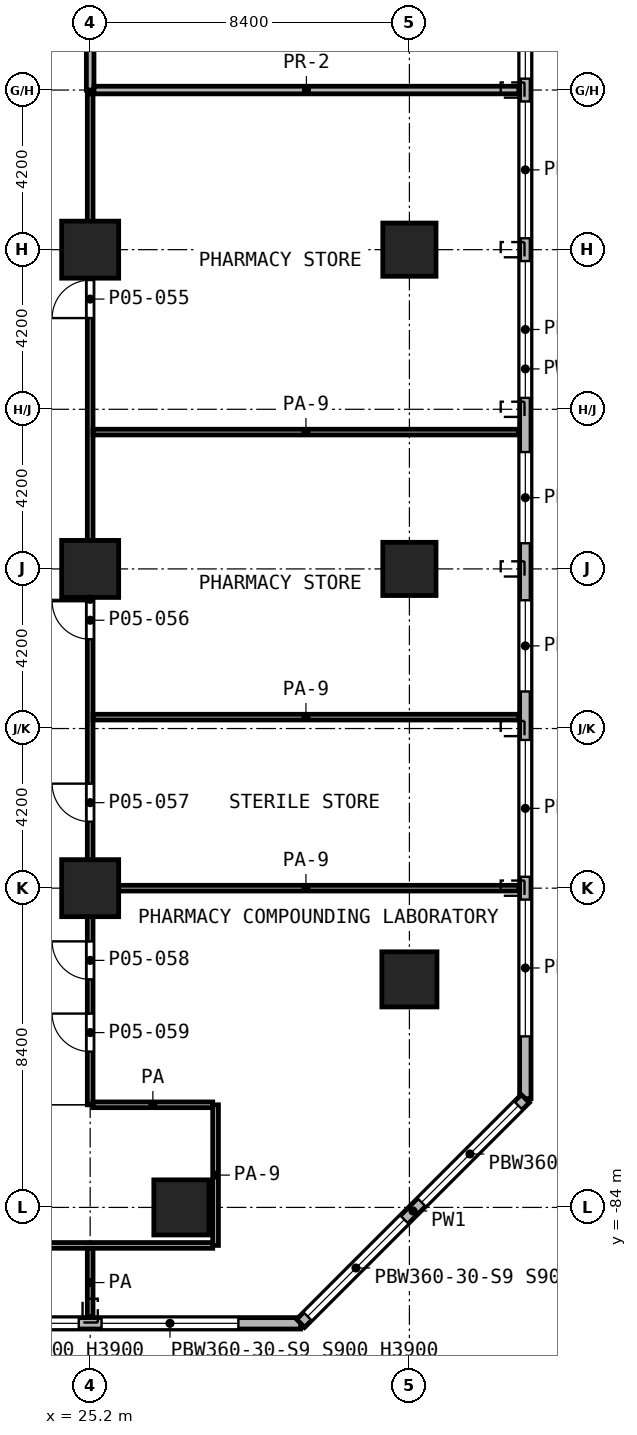
"""IFC4 building model, lengths in metres.
Left out: names, types, materials, properties, quantities, classifications, styles, units other than length and angle.
Written with IfcOpenShell. Run it as: python <this file> out.ifc"""

import sys

from ifc_helpers import new_model, si_unit, direction, frame, frame_2d, origin, origin_2d, place, context, subcontext, project, spatial, rectangle, extrude, element, fill, save


model = new_model("IFC4")
c1 = context("Model", 3, precision=1e-05, world=origin(), true_north=direction((0.0, 1.0)))
c2 = subcontext(c1, "Body", "Model", "MODEL_VIEW")
j1 = project(units=[si_unit("LENGTHUNIT", "METRE"), si_unit("PLANEANGLEUNIT", "RADIAN")], contexts=[c1])
p1 = place(None, origin())
s1 = spatial("IfcSite", under=j1, at=p1, CompositionType="ELEMENT")
p2 = place(p1, origin())
s2 = spatial("IfcBuilding", under=s1, at=p2, CompositionType="ELEMENT")
p3 = place(p2, frame((0.0, 0.0, 23.8)))
s3 = spatial("IfcBuildingStorey", under=s2, at=p3, CompositionType="ELEMENT", Elevation=23.8)
p4 = place(p3, frame((25.2, -58.8, 0.0), z_axis=(0.0, 0.0, 1.0), x_axis=(1.0, 0.0, 0.0)))
e1 = element("IfcColumn", 1, at=p4, inside=s3, PredefinedType="COLUMN", context=c2, shape_type="SweptSolid", body=[
    extrude(rectangle(XDim=1.5, YDim=1.5, at=origin_2d()), origin(), (0.0, 0.0, 1.0), 5.2),
])
p5 = place(p3, frame((33.6, -58.8, 0.0), z_axis=(0.0, 0.0, 1.0), x_axis=(1.0, 0.0, 0.0)))
e2 = element("IfcColumn", 2, at=p5, inside=s3, PredefinedType="COLUMN", context=c2, shape_type="SweptSolid", body=[
    extrude(rectangle(XDim=1.4, YDim=1.4, at=origin_2d()), origin(), (0.0, 0.0, 1.0), 5.2),
])
p6 = place(p3, frame((25.2, -67.2, 0.0), z_axis=(0.0, 0.0, 1.0), x_axis=(1.0, 0.0, 0.0)))
e3 = element("IfcColumn", 3, at=p6, inside=s3, PredefinedType="COLUMN", context=c2, shape_type="SweptSolid", body=[
    extrude(rectangle(XDim=1.5, YDim=1.5, at=origin_2d()), origin(), (0.0, 0.0, 1.0), 5.2),
])
p7 = place(p3, frame((33.6, -67.2, 0.0), z_axis=(0.0, 0.0, 1.0), x_axis=(1.0, 0.0, 0.0)))
e4 = element("IfcColumn", 4, at=p7, inside=s3, PredefinedType="COLUMN", context=c2, shape_type="SweptSolid", body=[
    extrude(rectangle(XDim=1.4, YDim=1.4, at=origin_2d()), origin(), (0.0, 0.0, 1.0), 5.2),
])
p8 = place(p3, frame((25.2, -75.6, 0.0), z_axis=(0.0, 0.0, 1.0), x_axis=(1.0, 0.0, 0.0)))
e5 = element("IfcColumn", 5, at=p8, inside=s3, PredefinedType="COLUMN", context=c2, shape_type="SweptSolid", body=[
    extrude(rectangle(XDim=1.5, YDim=1.5, at=origin_2d()), origin(), (0.0, 0.0, 1.0), 5.2),
])
for number, where, z_axis, x_axis in (
    (6, (33.6, -78.0, 0.0), (0.0, 0.0, 1.0), (1.0, 0.0, 0.0)),
    (7, (27.6, -84.0, 0.0), (0.0, 0.0, 1.0), (1.0, 0.0, 0.0)),
):
    element("IfcColumn", number, at=place(p3, frame(where, z_axis=z_axis, x_axis=x_axis)), inside=s3, PredefinedType="COLUMN", context=c2, shape_type="SweptSolid", body=[
        extrude(rectangle(XDim=1.45, YDim=1.45, at=origin_2d()), origin(), (0.0, 0.0, 1.0), 5.2),
    ])
p9 = place(p3, frame((2.862, -87.05, 0.0), z_axis=(0.0, 0.0, 1.0), x_axis=(1.0, 0.0, 0.0)))
e8 = element("IfcWall", 8, at=p9, inside=s3, PredefinedType="SOLIDWALL", context=c2, shape_type="SweptSolid", body=[
    extrude(rectangle(XDim=27.876, YDim=0.3, at=frame_2d((13.938, 0.0))), origin(), (0.0, 0.0, 1.0), 4.85),
])
p10 = place(p9, frame((1.638, 0.0, 0.9)))
e9 = element("IfcOpeningElement", 9, at=p10, cuts=e8, PredefinedType="OPENING", context=c2, shape_type="SweptSolid", body=[
    extrude(rectangle(XDim=3.6, YDim=3.0, at=frame_2d((1.8, 1.5))), frame((0.0, 0.16, 0.0), z_axis=(0.0, -1.0, 0.0), x_axis=(1.0, 0.0, 0.0)), (0.0, 0.0, 1.0), 0.32),
])
p11 = place(p9, frame((6.363, 0.0, 0.9)))
e10 = element("IfcOpeningElement", 10, at=p11, cuts=e8, PredefinedType="OPENING", context=c2, shape_type="SweptSolid", body=[
    extrude(rectangle(XDim=1.2, YDim=3.0, at=frame_2d((0.6, 1.5))), frame((0.0, 0.16, 0.0), z_axis=(0.0, -1.0, 0.0), x_axis=(1.0, 0.0, 0.0)), (0.0, 0.0, 1.0), 0.32),
])
p12 = place(p9, frame((10.038, 0.0, 0.9)))
e11 = element("IfcOpeningElement", 11, at=p12, cuts=e8, PredefinedType="OPENING", context=c2, shape_type="SweptSolid", body=[
    extrude(rectangle(XDim=3.6, YDim=3.0, at=frame_2d((1.8, 1.5))), frame((0.0, 0.16, 0.0), z_axis=(0.0, -1.0, 0.0), x_axis=(1.0, 0.0, 0.0)), (0.0, 0.0, 1.0), 0.32),
])
p13 = place(p9, frame((14.238, 0.0, 0.9)))
e12 = element("IfcOpeningElement", 12, at=p13, cuts=e8, PredefinedType="OPENING", context=c2, shape_type="SweptSolid", body=[
    extrude(rectangle(XDim=3.6, YDim=3.0, at=frame_2d((1.8, 1.5))), frame((0.0, 0.16, 0.0), z_axis=(0.0, -1.0, 0.0), x_axis=(1.0, 0.0, 0.0)), (0.0, 0.0, 1.0), 0.32),
])
p14 = place(p9, frame((18.438, 0.0, 0.9)))
e13 = element("IfcOpeningElement", 13, at=p14, cuts=e8, PredefinedType="OPENING", context=c2, shape_type="SweptSolid", body=[
    extrude(rectangle(XDim=3.6, YDim=3.0, at=frame_2d((1.8, 1.5))), frame((0.0, 0.16, 0.0), z_axis=(0.0, -1.0, 0.0), x_axis=(1.0, 0.0, 0.0)), (0.0, 0.0, 1.0), 0.32),
])
p15 = place(p9, frame((22.638, 0.0, 0.9)))
e14 = element("IfcOpeningElement", 14, at=p15, cuts=e8, PredefinedType="OPENING", context=c2, shape_type="SweptSolid", body=[
    extrude(rectangle(XDim=3.6, YDim=3.0, at=frame_2d((1.8, 1.5))), frame((0.0, 0.16, 0.0), z_axis=(0.0, -1.0, 0.0), x_axis=(1.0, 0.0, 0.0)), (0.0, 0.0, 1.0), 0.32),
])
p16 = place(p3, frame((30.738, -87.05, 0.0), z_axis=(0.0, 0.0, 1.0), x_axis=(0.707106781187, 0.707106781187, 0.0)))
e15 = element("IfcWall", 15, at=p16, inside=s3, PredefinedType="SOLIDWALL", context=c2, shape_type="SweptSolid", body=[
    extrude(rectangle(XDim=8.361, YDim=0.3, at=frame_2d((4.181, 0.0))), origin(), (0.0, 0.0, 1.0), 4.85),
])
p17 = place(p16, frame((0.259, 0.0, 0.9)))
e16 = element("IfcOpeningElement", 16, at=p17, cuts=e15, PredefinedType="OPENING", context=c2, shape_type="SweptSolid", body=[
    extrude(rectangle(XDim=3.6, YDim=3.0, at=frame_2d((1.8, 1.5))), frame((0.0, 0.16, 0.0), z_axis=(0.0, -1.0, 0.0), x_axis=(1.0, 0.0, 0.0)), (0.0, 0.0, 1.0), 0.32),
])
p18 = place(p16, frame((4.502, 0.0, 0.9)))
e17 = element("IfcOpeningElement", 17, at=p18, cuts=e15, PredefinedType="OPENING", context=c2, shape_type="SweptSolid", body=[
    extrude(rectangle(XDim=3.6, YDim=3.0, at=frame_2d((1.8, 1.5))), frame((0.0, 0.16, 0.0), z_axis=(0.0, -1.0, 0.0), x_axis=(1.0, 0.0, 0.0)), (0.0, 0.0, 1.0), 0.32),
])
p19 = place(p3, frame((36.65, -81.138, 0.0), z_axis=(0.0, 0.0, 1.0), x_axis=(0.0, 1.0, 0.0)))
e18 = element("IfcWall", 18, at=p19, inside=s3, PredefinedType="SOLIDWALL", context=c2, shape_type="SweptSolid", body=[
    extrude(rectangle(XDim=38.4, YDim=0.3, at=frame_2d((19.2, 0.0))), origin(), (0.0, 0.0, 1.0), 4.85),
])
p20 = place(p19, frame((1.638, 0.0, 0.9)))
e19 = element("IfcOpeningElement", 19, at=p20, cuts=e18, PredefinedType="OPENING", context=c2, shape_type="SweptSolid", body=[
    extrude(rectangle(XDim=3.6, YDim=3.0, at=frame_2d((1.8, 1.5))), frame((0.0, 0.16, 0.0), z_axis=(0.0, -1.0, 0.0), x_axis=(1.0, 0.0, 0.0)), (0.0, 0.0, 1.0), 0.32),
])
p21 = place(p19, frame((5.838, 0.0, 0.9)))
e20 = element("IfcOpeningElement", 20, at=p21, cuts=e18, PredefinedType="OPENING", context=c2, shape_type="SweptSolid", body=[
    extrude(rectangle(XDim=3.6, YDim=3.0, at=frame_2d((1.8, 1.5))), frame((0.0, 0.16, 0.0), z_axis=(0.0, -1.0, 0.0), x_axis=(1.0, 0.0, 0.0)), (0.0, 0.0, 1.0), 0.32),
])
p22 = place(p19, frame((10.713, 0.0, 0.9)))
e21 = element("IfcOpeningElement", 21, at=p22, cuts=e18, PredefinedType="OPENING", context=c2, shape_type="SweptSolid", body=[
    extrude(rectangle(XDim=2.4, YDim=3.0, at=frame_2d((1.2, 1.5))), frame((0.0, 0.16, 0.0), z_axis=(0.0, -1.0, 0.0), x_axis=(1.0, 0.0, 0.0)), (0.0, 0.0, 1.0), 0.32),
])
p23 = place(p19, frame((14.613, 0.0, 0.9)))
e22 = element("IfcOpeningElement", 22, at=p23, cuts=e18, PredefinedType="OPENING", context=c2, shape_type="SweptSolid", body=[
    extrude(rectangle(XDim=2.4, YDim=3.0, at=frame_2d((1.2, 1.5))), frame((0.0, 0.16, 0.0), z_axis=(0.0, -1.0, 0.0), x_axis=(1.0, 0.0, 0.0)), (0.0, 0.0, 1.0), 0.32),
])
p24 = place(p19, frame((18.438, 0.0, 0.9)))
e23 = element("IfcOpeningElement", 23, at=p24, cuts=e18, PredefinedType="OPENING", context=c2, shape_type="SweptSolid", body=[
    extrude(rectangle(XDim=3.6, YDim=3.0, at=frame_2d((1.8, 1.5))), frame((0.0, 0.16, 0.0), z_axis=(0.0, -1.0, 0.0), x_axis=(1.0, 0.0, 0.0)), (0.0, 0.0, 1.0), 0.32),
])
p25 = place(p19, frame((22.638, 0.0, 0.9)))
e24 = element("IfcOpeningElement", 24, at=p25, cuts=e18, PredefinedType="OPENING", context=c2, shape_type="SweptSolid", body=[
    extrude(rectangle(XDim=3.6, YDim=3.0, at=frame_2d((1.8, 1.5))), frame((0.0, 0.16, 0.0), z_axis=(0.0, -1.0, 0.0), x_axis=(1.0, 0.0, 0.0)), (0.0, 0.0, 1.0), 0.32),
])
p26 = place(p19, frame((26.838, 0.0, 0.9)))
e25 = element("IfcOpeningElement", 25, at=p26, cuts=e18, PredefinedType="OPENING", context=c2, shape_type="SweptSolid", body=[
    extrude(rectangle(XDim=3.6, YDim=3.0, at=frame_2d((1.8, 1.5))), frame((0.0, 0.16, 0.0), z_axis=(0.0, -1.0, 0.0), x_axis=(1.0, 0.0, 0.0)), (0.0, 0.0, 1.0), 0.32),
])
p27 = place(p19, frame((31.038, 0.0, 0.9)))
e26 = element("IfcOpeningElement", 26, at=p27, cuts=e18, PredefinedType="OPENING", context=c2, shape_type="SweptSolid", body=[
    extrude(rectangle(XDim=3.6, YDim=3.0, at=frame_2d((1.8, 1.5))), frame((0.0, 0.16, 0.0), z_axis=(0.0, -1.0, 0.0), x_axis=(1.0, 0.0, 0.0)), (0.0, 0.0, 1.0), 0.32),
])
p28 = place(p19, frame((35.438, 0.0, 0.9)))
e27 = element("IfcOpeningElement", 27, at=p28, cuts=e18, PredefinedType="OPENING", context=c2, shape_type="SweptSolid", body=[
    extrude(rectangle(XDim=2.4, YDim=3.0, at=frame_2d((1.2, 1.5))), frame((0.0, 0.16, 0.0), z_axis=(0.0, -1.0, 0.0), x_axis=(1.0, 0.0, 0.0)), (0.0, 0.0, 1.0), 0.32),
])
p29 = place(p3, frame((11.175, -85.0, 0.0), z_axis=(0.0, 0.0, 1.0), x_axis=(1.0, 0.0, 0.0)))
e28 = element("IfcWall", 28, at=p29, inside=s3, PredefinedType="PARTITIONING", context=c2, shape_type="SweptSolid", body=[
    extrude(rectangle(XDim=17.25, YDim=0.15, at=frame_2d((8.625, 0.0))), origin(), (0.0, 0.0, 1.0), 3.95),
])
p30 = place(p29, frame((6.475, 0.0, 0.0)))
e29 = element("IfcOpeningElement", 29, at=p30, cuts=e28, PredefinedType="OPENING", context=c2, shape_type="SweptSolid", body=[
    extrude(rectangle(XDim=1.0, YDim=2.1, at=frame_2d((0.5, 1.05))), frame((0.0, 0.085, 0.0), z_axis=(0.0, -1.0, 0.0), x_axis=(1.0, 0.0, 0.0)), (0.0, 0.0, 1.0), 0.17),
])
p31 = place(p3, frame((25.275, -81.3, 0.0), z_axis=(0.0, 0.0, 1.0), x_axis=(1.0, 0.0, 0.0)))
e30 = element("IfcWall", 30, at=p31, inside=s3, PredefinedType="PARTITIONING", context=c2, shape_type="SweptSolid", body=[
    extrude(rectangle(XDim=3.15, YDim=0.15, at=frame_2d((1.575, 0.0))), origin(), (0.0, 0.0, 1.0), 4.85),
])
for number, where, z_axis, x_axis in (
    (31, (25.275, -75.6, 0.0), (0.0, 0.0, 1.0), (1.0, 0.0, 0.0)),
    (32, (25.275, -71.1, 0.0), (0.0, 0.0, 1.0), (1.0, 0.0, 0.0)),
    (33, (25.275, -63.6, 0.0), (0.0, 0.0, 1.0), (1.0, 0.0, 0.0)),
):
    element("IfcWall", number, at=place(p3, frame(where, z_axis=z_axis, x_axis=x_axis)), inside=s3, PredefinedType="PARTITIONING", context=c2, shape_type="SweptSolid", body=[
        extrude(rectangle(XDim=11.205, YDim=0.15, at=frame_2d((5.603, 0.0))), origin(), (0.0, 0.0, 1.0), 3.45),
    ])
p32 = place(p3, frame((25.2, -86.88, 0.0), z_axis=(0.0, 0.0, 1.0), x_axis=(0.0, 1.0, 0.0)))
e34 = element("IfcWall", 34, at=p32, inside=s3, PredefinedType="PARTITIONING", context=c2, shape_type="SweptSolid", body=[
    extrude(rectangle(XDim=1.805, YDim=0.15, at=frame_2d((0.902, 0.0))), origin(), (0.0, 0.0, 1.0), 4.85),
])
p33 = place(p3, frame((25.2, -81.3, 0.0), z_axis=(0.0, 0.0, 1.0), x_axis=(0.0, 1.0, 0.0)))
e35 = element("IfcWall", 35, at=p33, inside=s3, PredefinedType="PARTITIONING", context=c2, shape_type="SweptSolid", body=[
    extrude(rectangle(XDim=26.6, YDim=0.15, at=frame_2d((13.3, 0.0))), origin(), (0.0, 0.0, 1.0), 4.85),
])
p34 = place(p33, frame((20.7, 0.0, 0.0)))
e36 = element("IfcOpeningElement", 36, at=p34, cuts=e35, PredefinedType="OPENING", context=c2, shape_type="SweptSolid", body=[
    extrude(rectangle(XDim=1.0, YDim=2.1, at=frame_2d((0.5, 1.05))), frame((0.0, 0.085, 0.0), z_axis=(0.0, -1.0, 0.0), x_axis=(1.0, 0.0, 0.0)), (0.0, 0.0, 1.0), 0.17),
])
p35 = place(p33, frame((12.25, 0.0, 0.0)))
e37 = element("IfcOpeningElement", 37, at=p35, cuts=e35, PredefinedType="OPENING", context=c2, shape_type="SweptSolid", body=[
    extrude(rectangle(XDim=1.0, YDim=2.1, at=frame_2d((0.5, 1.05))), frame((0.0, 0.085, 0.0), z_axis=(0.0, -1.0, 0.0), x_axis=(1.0, 0.0, 0.0)), (0.0, 0.0, 1.0), 0.17),
])
p36 = place(p33, frame((7.45, 0.0, 0.0)))
e38 = element("IfcOpeningElement", 38, at=p36, cuts=e35, PredefinedType="OPENING", context=c2, shape_type="SweptSolid", body=[
    extrude(rectangle(XDim=1.0, YDim=2.1, at=frame_2d((0.5, 1.05))), frame((0.0, 0.085, 0.0), z_axis=(0.0, -1.0, 0.0), x_axis=(1.0, 0.0, 0.0)), (0.0, 0.0, 1.0), 0.17),
])
p37 = place(p33, frame((3.3, 0.0, 0.0)))
e39 = element("IfcOpeningElement", 39, at=p37, cuts=e35, PredefinedType="OPENING", context=c2, shape_type="SweptSolid", body=[
    extrude(rectangle(XDim=1.0, YDim=2.1, at=frame_2d((0.5, 1.05))), frame((0.0, 0.085, 0.0), z_axis=(0.0, -1.0, 0.0), x_axis=(1.0, 0.0, 0.0)), (0.0, 0.0, 1.0), 0.17),
])
p38 = place(p33, frame((1.4, 0.0, 0.0)))
e40 = element("IfcOpeningElement", 40, at=p38, cuts=e35, PredefinedType="OPENING", context=c2, shape_type="SweptSolid", body=[
    extrude(rectangle(XDim=1.0, YDim=2.1, at=frame_2d((0.5, 1.05))), frame((0.0, 0.085, 0.0), z_axis=(0.0, -1.0, 0.0), x_axis=(1.0, 0.0, 0.0)), (0.0, 0.0, 1.0), 0.17),
])
p39 = place(p3, frame((28.5, -85.0, 0.0), z_axis=(0.0, 0.0, 1.0), x_axis=(0.0, 1.0, 0.0)))
e41 = element("IfcWall", 41, at=p39, inside=s3, PredefinedType="PARTITIONING", context=c2, shape_type="SweptSolid", body=[
    extrude(rectangle(XDim=3.7, YDim=0.15, at=frame_2d((1.85, 0.0))), origin(), (0.0, 0.0, 1.0), 3.45),
])
p40 = place(p3, frame((25.3, -54.6, 0.0), z_axis=(0.0, 0.0, 1.0), x_axis=(1.0, 0.0, 0.0)))
e42 = element("IfcWall", 42, at=p40, inside=s3, PredefinedType="PARTITIONING", context=c2, shape_type="SweptSolid", body=[
    extrude(rectangle(XDim=11.18, YDim=0.2, at=frame_2d((5.59, 0.0))), origin(), (0.0, 0.0, 1.0), 3.45),
])
p41 = place(p3, frame((25.2, -54.6, 0.0), z_axis=(0.0, 0.0, 1.0), x_axis=(0.0, 1.0, 0.0)))
e43 = element("IfcWall", 43, at=p41, inside=s3, PredefinedType="PARTITIONING", context=c2, shape_type="SweptSolid", body=[
    extrude(rectangle(XDim=12.6, YDim=0.2, at=frame_2d((6.3, 0.0))), origin(), (0.0, 0.0, 1.0), 4.85),
])
p42 = place(p41, frame((7.8, 0.0, 0.0)))
e44 = element("IfcOpeningElement", 44, at=p42, cuts=e43, PredefinedType="OPENING", context=c2, shape_type="SweptSolid", body=[
    extrude(rectangle(XDim=1.2, YDim=2.1, at=frame_2d((0.6, 1.05))), frame((0.0, 0.11, 0.0), z_axis=(0.0, -1.0, 0.0), x_axis=(1.0, 0.0, 0.0)), (0.0, 0.0, 1.0), 0.22),
])
p43 = place(p41, frame((5.0, 0.0, 0.0)))
e45 = element("IfcOpeningElement", 45, at=p43, cuts=e43, PredefinedType="OPENING", context=c2, shape_type="SweptSolid", body=[
    extrude(rectangle(XDim=1.2, YDim=2.1, at=frame_2d((0.6, 1.05))), frame((0.0, 0.11, 0.0), z_axis=(0.0, -1.0, 0.0), x_axis=(1.0, 0.0, 0.0)), (0.0, 0.0, 1.0), 0.22),
])
p44 = place(p14, origin())
e46 = element("IfcWindow", 46, at=p44, inside=s3, PartitioningType="SINGLE_PANEL", PredefinedType="WINDOW", context=c2, shape_type="SweptSolid", body=[
    extrude(rectangle(XDim=3.6, YDim=3.0, at=frame_2d((1.8, 1.5))), frame((0.0, 0.03, 0.0), z_axis=(0.0, -1.0, 0.0), x_axis=(1.0, 0.0, 0.0)), (0.0, 0.0, 1.0), 0.06),
])
fill(e13, e46)
p45 = place(p15, origin())
e47 = element("IfcWindow", 47, at=p45, inside=s3, PartitioningType="SINGLE_PANEL", PredefinedType="WINDOW", context=c2, shape_type="SweptSolid", body=[
    extrude(rectangle(XDim=3.6, YDim=3.0, at=frame_2d((1.8, 1.5))), frame((0.0, 0.03, 0.0), z_axis=(0.0, -1.0, 0.0), x_axis=(1.0, 0.0, 0.0)), (0.0, 0.0, 1.0), 0.06),
])
fill(e14, e47)
p46 = place(p17, origin())
e48 = element("IfcWindow", 48, at=p46, inside=s3, PartitioningType="SINGLE_PANEL", PredefinedType="WINDOW", context=c2, shape_type="SweptSolid", body=[
    extrude(rectangle(XDim=3.6, YDim=3.0, at=frame_2d((1.8, 1.5))), frame((0.0, 0.03, 0.0), z_axis=(0.0, -1.0, 0.0), x_axis=(1.0, 0.0, 0.0)), (0.0, 0.0, 1.0), 0.06),
])
fill(e16, e48)
p47 = place(p18, origin())
e49 = element("IfcWindow", 49, at=p47, inside=s3, PartitioningType="SINGLE_PANEL", PredefinedType="WINDOW", context=c2, shape_type="SweptSolid", body=[
    extrude(rectangle(XDim=3.6, YDim=3.0, at=frame_2d((1.8, 1.5))), frame((0.0, 0.03, 0.0), z_axis=(0.0, -1.0, 0.0), x_axis=(1.0, 0.0, 0.0)), (0.0, 0.0, 1.0), 0.06),
])
fill(e17, e49)
p48 = place(p20, origin())
e50 = element("IfcWindow", 50, at=p48, inside=s3, PartitioningType="SINGLE_PANEL", PredefinedType="WINDOW", context=c2, shape_type="SweptSolid", body=[
    extrude(rectangle(XDim=3.6, YDim=3.0, at=frame_2d((1.8, 1.5))), frame((0.0, 0.03, 0.0), z_axis=(0.0, -1.0, 0.0), x_axis=(1.0, 0.0, 0.0)), (0.0, 0.0, 1.0), 0.06),
])
fill(e19, e50)
p49 = place(p21, origin())
e51 = element("IfcWindow", 51, at=p49, inside=s3, PartitioningType="SINGLE_PANEL", PredefinedType="WINDOW", context=c2, shape_type="SweptSolid", body=[
    extrude(rectangle(XDim=3.6, YDim=3.0, at=frame_2d((1.8, 1.5))), frame((0.0, 0.03, 0.0), z_axis=(0.0, -1.0, 0.0), x_axis=(1.0, 0.0, 0.0)), (0.0, 0.0, 1.0), 0.06),
])
fill(e20, e51)
p50 = place(p22, origin())
e52 = element("IfcWindow", 52, at=p50, inside=s3, PartitioningType="SINGLE_PANEL", PredefinedType="WINDOW", context=c2, shape_type="SweptSolid", body=[
    extrude(rectangle(XDim=2.4, YDim=3.0, at=frame_2d((1.2, 1.5))), frame((0.0, 0.03, 0.0), z_axis=(0.0, -1.0, 0.0), x_axis=(1.0, 0.0, 0.0)), (0.0, 0.0, 1.0), 0.06),
])
fill(e21, e52)
p51 = place(p23, origin())
e53 = element("IfcWindow", 53, at=p51, inside=s3, PartitioningType="SINGLE_PANEL", PredefinedType="WINDOW", context=c2, shape_type="SweptSolid", body=[
    extrude(rectangle(XDim=2.4, YDim=3.0, at=frame_2d((1.2, 1.5))), frame((0.0, 0.03, 0.0), z_axis=(0.0, -1.0, 0.0), x_axis=(1.0, 0.0, 0.0)), (0.0, 0.0, 1.0), 0.06),
])
fill(e22, e53)
p52 = place(p24, origin())
e54 = element("IfcWindow", 54, at=p52, inside=s3, PartitioningType="SINGLE_PANEL", PredefinedType="WINDOW", context=c2, shape_type="SweptSolid", body=[
    extrude(rectangle(XDim=3.6, YDim=3.0, at=frame_2d((1.8, 1.5))), frame((0.0, 0.03, 0.0), z_axis=(0.0, -1.0, 0.0), x_axis=(1.0, 0.0, 0.0)), (0.0, 0.0, 1.0), 0.06),
])
fill(e23, e54)
p53 = place(p25, origin())
e55 = element("IfcWindow", 55, at=p53, inside=s3, PartitioningType="SINGLE_PANEL", PredefinedType="WINDOW", context=c2, shape_type="SweptSolid", body=[
    extrude(rectangle(XDim=3.6, YDim=3.0, at=frame_2d((1.8, 1.5))), frame((0.0, 0.03, 0.0), z_axis=(0.0, -1.0, 0.0), x_axis=(1.0, 0.0, 0.0)), (0.0, 0.0, 1.0), 0.06),
])
fill(e24, e55)
p54 = place(p26, origin())
e56 = element("IfcWindow", 56, at=p54, inside=s3, PartitioningType="SINGLE_PANEL", PredefinedType="WINDOW", context=c2, shape_type="SweptSolid", body=[
    extrude(rectangle(XDim=3.6, YDim=3.0, at=frame_2d((1.8, 1.5))), frame((0.0, 0.03, 0.0), z_axis=(0.0, -1.0, 0.0), x_axis=(1.0, 0.0, 0.0)), (0.0, 0.0, 1.0), 0.06),
])
fill(e25, e56)
p55 = place(p34, origin())
e57 = element("IfcDoor", 57, at=p55, inside=s3, OperationType="SINGLE_SWING_LEFT", PredefinedType="DOOR", context=c2, shape_type="SweptSolid", body=[
    extrude(rectangle(XDim=1.0, YDim=2.1, at=frame_2d((0.5, 1.05))), frame((0.0, 0.025, 0.0), z_axis=(0.0, -1.0, 0.0), x_axis=(1.0, 0.0, 0.0)), (0.0, 0.0, 1.0), 0.05),
])
fill(e36, e57)
p56 = place(p35, origin())
e58 = element("IfcDoor", 58, at=p56, inside=s3, OperationType="SINGLE_SWING_RIGHT", PredefinedType="DOOR", context=c2, shape_type="SweptSolid", body=[
    extrude(rectangle(XDim=1.0, YDim=2.1, at=frame_2d((0.5, 1.05))), frame((0.0, 0.025, 0.0), z_axis=(0.0, -1.0, 0.0), x_axis=(1.0, 0.0, 0.0)), (0.0, 0.0, 1.0), 0.05),
])
fill(e37, e58)
p57 = place(p36, origin())
e59 = element("IfcDoor", 59, at=p57, inside=s3, OperationType="SINGLE_SWING_RIGHT", PredefinedType="DOOR", context=c2, shape_type="SweptSolid", body=[
    extrude(rectangle(XDim=1.0, YDim=2.1, at=frame_2d((0.5, 1.05))), frame((0.0, 0.025, 0.0), z_axis=(0.0, -1.0, 0.0), x_axis=(1.0, 0.0, 0.0)), (0.0, 0.0, 1.0), 0.05),
])
fill(e38, e59)
p58 = place(p37, origin())
e60 = element("IfcDoor", 60, at=p58, inside=s3, OperationType="SINGLE_SWING_RIGHT", PredefinedType="DOOR", context=c2, shape_type="SweptSolid", body=[
    extrude(rectangle(XDim=1.0, YDim=2.1, at=frame_2d((0.5, 1.05))), frame((0.0, 0.025, 0.0), z_axis=(0.0, -1.0, 0.0), x_axis=(1.0, 0.0, 0.0)), (0.0, 0.0, 1.0), 0.05),
])
fill(e39, e60)
p59 = place(p38, origin())
e61 = element("IfcDoor", 61, at=p59, inside=s3, OperationType="SINGLE_SWING_RIGHT", PredefinedType="DOOR", context=c2, shape_type="SweptSolid", body=[
    extrude(rectangle(XDim=1.0, YDim=2.1, at=frame_2d((0.5, 1.05))), frame((0.0, 0.025, 0.0), z_axis=(0.0, -1.0, 0.0), x_axis=(1.0, 0.0, 0.0)), (0.0, 0.0, 1.0), 0.05),
])
fill(e40, e61)
save(model, sys.argv[1])
